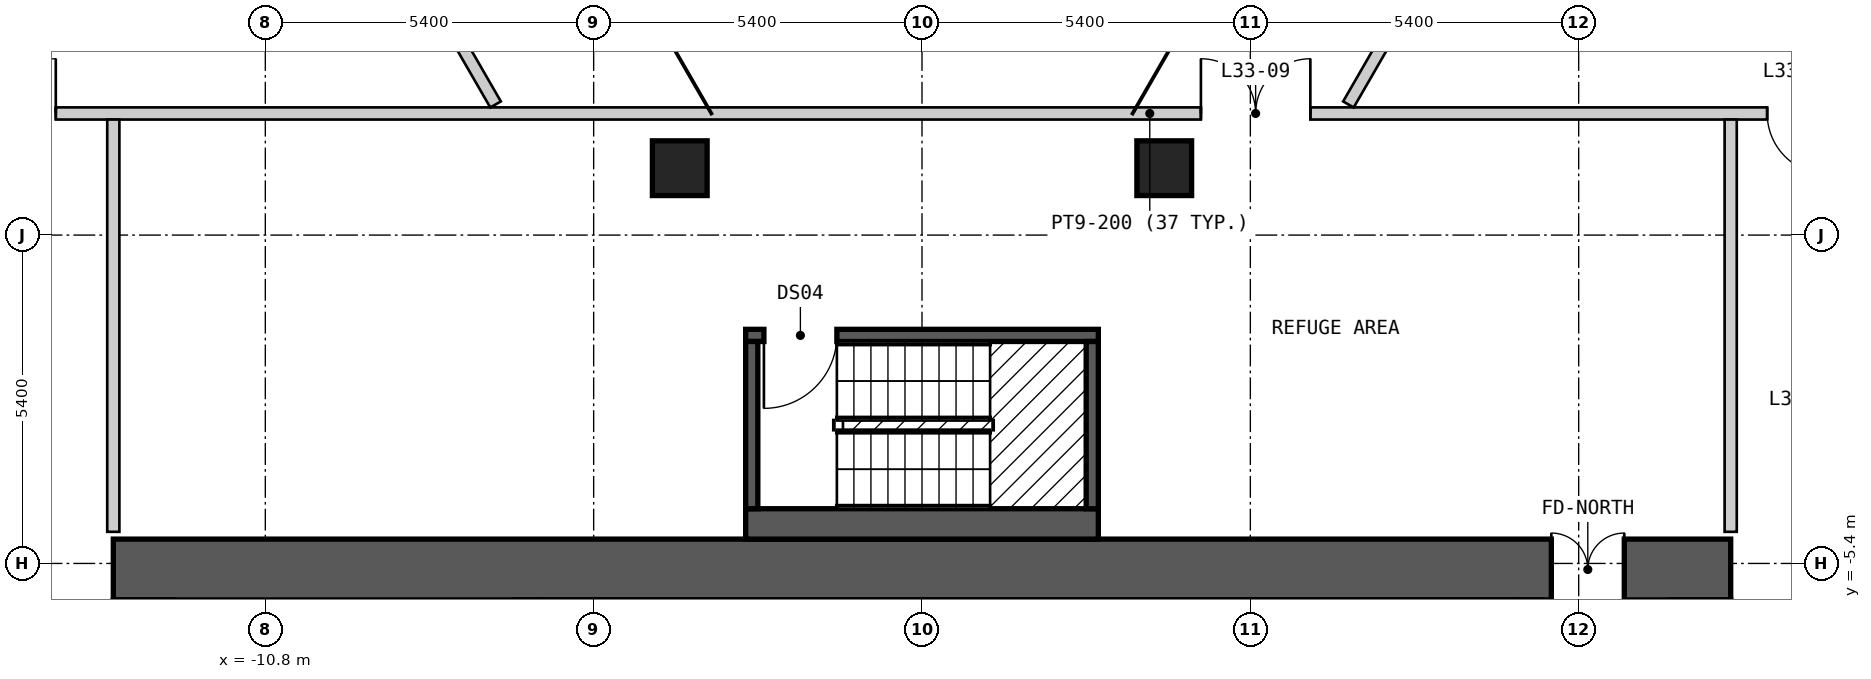
"""IFC4 building model, lengths in metres.
Left out: names, types, materials, properties, quantities, classifications, styles, units other than length and angle.
Written with IfcOpenShell. Run it as: python <this file> out.ifc"""

import sys

from ifc_helpers import new_model, si_unit, direction, frame, frame_2d, origin, origin_2d, place, context, subcontext, project, spatial, rectangle, extrude, element, fill, save


model = new_model("IFC4")
c1 = context("Model", 3, precision=1e-05, world=origin(), true_north=direction((0.0, 1.0)))
c2 = subcontext(c1, "Body", "Model", "MODEL_VIEW")
j1 = project(units=[si_unit("LENGTHUNIT", "METRE"), si_unit("PLANEANGLEUNIT", "RADIAN")], contexts=[c1])
p1 = place(None, origin())
s1 = spatial("IfcSite", under=j1, at=p1, CompositionType="ELEMENT")
p2 = place(p1, origin())
s2 = spatial("IfcBuilding", under=s1, at=p2, CompositionType="ELEMENT")
p3 = place(p2, frame((0.0, 0.0, 108.0)))
s3 = spatial("IfcBuildingStorey", under=s2, at=p3, CompositionType="ELEMENT", Elevation=108.0)
for number, where, z_axis, x_axis in (
    (1, (3.984, 1.1, 0.0), (0.0, 0.0, 1.0), (1.0, 0.0, 0.0)),
    (2, (-3.984, 1.1, 0.0), (0.0, 0.0, 1.0), (1.0, 0.0, 0.0)),
):
    element("IfcColumn", number, at=place(p3, frame(where, z_axis=z_axis, x_axis=x_axis)), inside=s3, PredefinedType="COLUMN", context=c2, shape_type="SweptSolid", body=[
        extrude(rectangle(XDim=0.9, YDim=0.9, at=origin_2d()), origin(), (0.0, 0.0, 1.0), 3.6),
    ])
p4 = place(p3, frame((-13.3, -5.5, 0.0), z_axis=(0.0, 0.0, 1.0), x_axis=(1.0, 0.0, 0.0)))
e3 = element("IfcWall", 3, at=p4, inside=s3, PredefinedType="SHEAR", context=c2, shape_type="SweptSolid", body=[
    extrude(rectangle(XDim=26.6, YDim=1.0, at=frame_2d((13.3, 0.0))), origin(), (0.0, 0.0, 1.0), 2.6),
])
p5 = place(p4, frame((23.65, 0.0, 0.0)))
e4 = element("IfcOpeningElement", 4, at=p5, cuts=e3, PredefinedType="OPENING", context=c2, shape_type="SweptSolid", body=[
    extrude(rectangle(XDim=1.2, YDim=2.1, at=frame_2d((0.6, 1.05))), frame((0.0, 0.51, 0.0), z_axis=(0.0, -1.0, 0.0), x_axis=(1.0, 0.0, 0.0)), (0.0, 0.0, 1.0), 1.02),
])
p6 = place(p3, frame((-2.9, -4.75, 0.0), z_axis=(0.0, 0.0, 1.0), x_axis=(1.0, 0.0, 0.0)))
e5 = element("IfcWall", 5, at=p6, inside=s3, PredefinedType="SOLIDWALL", context=c2, shape_type="SweptSolid", body=[
    extrude(rectangle(XDim=5.8, YDim=0.5, at=frame_2d((2.9, 0.0))), origin(), (0.0, 0.0, 1.0), 2.6),
])
p7 = place(p3, frame((-2.9, -1.65, 0.0), z_axis=(0.0, 0.0, 1.0), x_axis=(1.0, 0.0, 0.0)))
e6 = element("IfcWall", 6, at=p7, inside=s3, PredefinedType="SOLIDWALL", context=c2, shape_type="SweptSolid", body=[
    extrude(rectangle(XDim=5.8, YDim=0.2, at=frame_2d((2.9, 0.0))), origin(), (0.0, 0.0, 1.0), 2.6),
])
p8 = place(p7, frame((0.3, 0.0, 0.0)))
e7 = element("IfcOpeningElement", 7, at=p8, cuts=e6, PredefinedType="OPENING", context=c2, shape_type="SweptSolid", body=[
    extrude(rectangle(XDim=1.2, YDim=2.1, at=frame_2d((0.6, 1.05))), frame((0.0, 0.11, 0.0), z_axis=(0.0, -1.0, 0.0), x_axis=(1.0, 0.0, 0.0)), (0.0, 0.0, 1.0), 0.22),
])
for number, where, z_axis, x_axis in (
    (8, (-2.8, -4.5, 0.0), (0.0, 0.0, 1.0), (0.0, 1.0, 0.0)),
    (9, (2.8, -4.5, 0.0), (0.0, 0.0, 1.0), (0.0, 1.0, 0.0)),
):
    element("IfcWall", number, at=place(p3, frame(where, z_axis=z_axis, x_axis=x_axis)), inside=s3, PredefinedType="SOLIDWALL", context=c2, shape_type="SweptSolid", body=[
        extrude(rectangle(XDim=2.75, YDim=0.2, at=frame_2d((1.375, 0.0))), origin(), (0.0, 0.0, 1.0), 2.6),
    ])
p9 = place(p3, frame((-16.592, 2.0, 0.0), z_axis=(0.0, 0.0, 1.0), x_axis=(1.0, 0.0, 0.0)))
e10 = element("IfcWall", 10, at=p9, inside=s3, PredefinedType="SOLIDWALL", context=c2, shape_type="SweptSolid", body=[
    extrude(rectangle(XDim=40.676, YDim=0.2, at=frame_2d((20.338, 0.0))), origin(), (0.0, 0.0, 1.0), 2.6),
])
p10 = place(p9, frame((0.546, 0.0, 0.0)))
e11 = element("IfcOpeningElement", 11, at=p10, cuts=e10, PredefinedType="OPENING", context=c2, shape_type="SweptSolid", body=[
    extrude(rectangle(XDim=1.8, YDim=2.1, at=frame_2d((0.9, 1.05))), frame((0.0, 0.11, 0.0), z_axis=(0.0, -1.0, 0.0), x_axis=(1.0, 0.0, 0.0)), (0.0, 0.0, 1.0), 0.22),
])
p11 = place(p9, frame((30.492, 0.0, 0.0)))
e12 = element("IfcOpeningElement", 12, at=p11, cuts=e10, PredefinedType="OPENING", context=c2, shape_type="SweptSolid", body=[
    extrude(rectangle(XDim=1.0, YDim=2.1, at=frame_2d((0.5, 1.05))), frame((0.0, 0.11, 0.0), z_axis=(0.0, -1.0, 0.0), x_axis=(1.0, 0.0, 0.0)), (0.0, 0.0, 1.0), 0.22),
])
p12 = place(p9, frame((21.179, 0.0, 0.0)))
e13 = element("IfcOpeningElement", 13, at=p12, cuts=e10, PredefinedType="OPENING", context=c2, shape_type="SweptSolid", body=[
    extrude(rectangle(XDim=1.8, YDim=2.1, at=frame_2d((0.9, 1.05))), frame((0.0, 0.11, 0.0), z_axis=(0.0, -1.0, 0.0), x_axis=(1.0, 0.0, 0.0)), (0.0, 0.0, 1.0), 0.22),
])
for number, where, z_axis, x_axis in (
    (14, (-13.3, -4.88, 0.0), (0.0, 0.0, 1.0), (0.0, 1.0, 0.0)),
    (15, (13.3, -4.88, 0.0), (0.0, 0.0, 1.0), (0.0, 1.0, 0.0)),
):
    element("IfcWall", number, at=place(p3, frame(where, z_axis=z_axis, x_axis=x_axis)), inside=s3, PredefinedType="PARTITIONING", context=c2, shape_type="SweptSolid", body=[
        extrude(rectangle(XDim=6.78, YDim=0.2, at=frame_2d((3.39, 0.0))), origin(), (0.0, 0.0, 1.0), 2.6),
    ])
p13 = place(p3, frame((-10.392, 8.0, 0.0), z_axis=(0.0, 0.0, 1.0), x_axis=(0.500051862572, -0.865995458844, 0.0)))
e16 = element("IfcWall", 16, at=p13, inside=s3, PredefinedType="SOLIDWALL", context=c2, shape_type="SweptSolid", body=[
    extrude(rectangle(XDim=6.758, YDim=0.2, at=frame_2d((3.379, 0.0))), origin(), (0.0, 0.0, 1.0), 2.6),
])
p14 = place(p3, frame((7.013, 2.148, 0.0), z_axis=(0.0, 0.0, 1.0), x_axis=(0.499983511822, 0.866034923029, 0.0)))
e17 = element("IfcWall", 17, at=p14, inside=s3, PredefinedType="SOLIDWALL", context=c2, shape_type="SweptSolid", body=[
    extrude(rectangle(XDim=6.584, YDim=0.2, at=frame_2d((3.292, 0.0))), origin(), (0.0, 0.0, 1.0), 2.6),
])
p15 = place(p8, origin())
e18 = element("IfcDoor", 18, at=p15, inside=s3, OperationType="SINGLE_SWING_LEFT", PredefinedType="DOOR", context=c2, shape_type="SweptSolid", body=[
    extrude(rectangle(XDim=1.2, YDim=2.1, at=frame_2d((0.6, 1.05))), frame((0.0, 0.025, 0.0), z_axis=(0.0, -1.0, 0.0), x_axis=(1.0, 0.0, 0.0)), (0.0, 0.0, 1.0), 0.05),
])
fill(e7, e18)
p16 = place(p10, origin())
e19 = element("IfcDoor", 19, at=p16, inside=s3, OperationType="DOUBLE_DOOR_SINGLE_SWING", PredefinedType="DOOR", context=c2, shape_type="SweptSolid", body=[
    extrude(rectangle(XDim=1.8, YDim=2.1, at=frame_2d((0.9, 1.05))), frame((0.0, 0.025, 0.0), z_axis=(0.0, -1.0, 0.0), x_axis=(1.0, 0.0, 0.0)), (0.0, 0.0, 1.0), 0.05),
])
fill(e11, e19)
p17 = place(p11, origin())
e20 = element("IfcDoor", 20, at=p17, inside=s3, OperationType="SINGLE_SWING_RIGHT", PredefinedType="DOOR", context=c2, shape_type="SweptSolid", body=[
    extrude(rectangle(XDim=1.0, YDim=2.1, at=frame_2d((0.5, 1.05))), frame((0.0, 0.025, 0.0), z_axis=(0.0, -1.0, 0.0), x_axis=(1.0, 0.0, 0.0)), (0.0, 0.0, 1.0), 0.05),
])
fill(e12, e20)
p18 = place(p12, origin())
e21 = element("IfcDoor", 21, at=p18, inside=s3, OperationType="DOUBLE_DOOR_SINGLE_SWING", PredefinedType="DOOR", context=c2, shape_type="SweptSolid", body=[
    extrude(rectangle(XDim=1.8, YDim=2.1, at=frame_2d((0.9, 1.05))), frame((0.0, 0.025, 0.0), z_axis=(0.0, -1.0, 0.0), x_axis=(1.0, 0.0, 0.0)), (0.0, 0.0, 1.0), 0.05),
])
fill(e13, e21)
p19 = place(p5, origin())
e22 = element("IfcDoor", 22, at=p19, inside=s3, OperationType="DOUBLE_DOOR_SINGLE_SWING", PredefinedType="DOOR", context=c2, shape_type="SweptSolid", body=[
    extrude(rectangle(XDim=1.2, YDim=2.1, at=frame_2d((0.6, 1.05))), frame((0.0, 0.025, 0.0), z_axis=(0.0, -1.0, 0.0), x_axis=(1.0, 0.0, 0.0)), (0.0, 0.0, 1.0), 0.05),
])
fill(e4, e22)
save(model, sys.argv[1])
